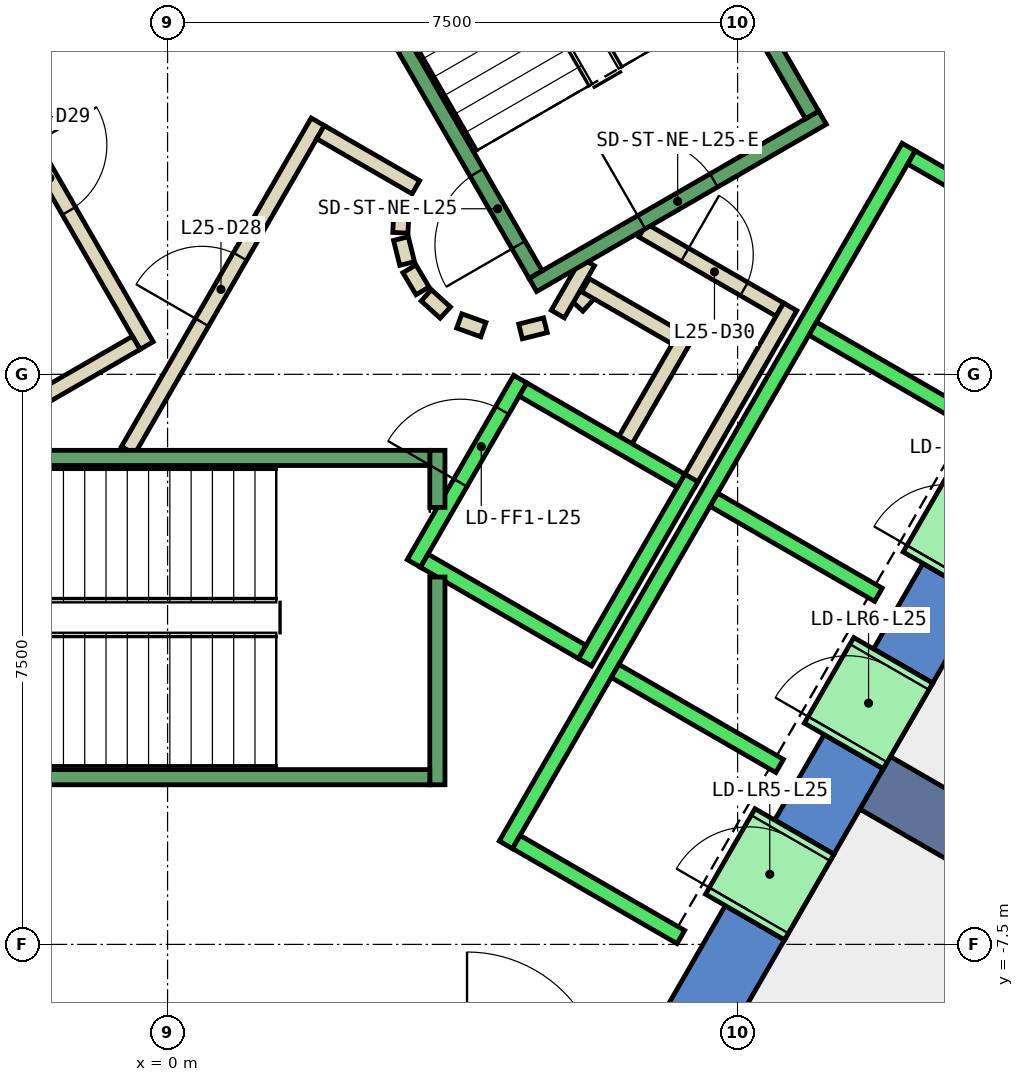
"""IFC4 building model, lengths in metres.
Left out: names, types, materials, properties, quantities, classifications, styles, units other than length and angle.
Written with IfcOpenShell. Run it as: python <this file> out.ifc"""

import sys

from ifc_helpers import new_model, si_unit, direction, frame, frame_2d, origin, place, context, subcontext, project, spatial, polyline, rectangle, outline, extrude, element, fill, save


model = new_model("IFC4")
c1 = context("Model", 3, precision=1e-05, world=origin(), true_north=direction((0.0, 1.0)))
c2 = subcontext(c1, "Body", "Model", "MODEL_VIEW")
j1 = project(units=[si_unit("LENGTHUNIT", "METRE"), si_unit("PLANEANGLEUNIT", "RADIAN")], contexts=[c1])
p1 = place(None, origin())
s1 = spatial("IfcSite", under=j1, at=p1, CompositionType="ELEMENT")
p2 = place(p1, origin())
s2 = spatial("IfcBuilding", under=s1, at=p2, CompositionType="ELEMENT")
p3 = place(p2, frame((0.0, 0.0, 116.0)))
s3 = spatial("IfcBuildingStorey", under=s2, at=p3, CompositionType="ELEMENT", Elevation=116.0)
p4 = place(p3, frame((0.0, 0.0, -0.4)))
e1 = element("IfcWall", 1, at=p4, inside=s3, PredefinedType="SHEAR", context=c2, shape_type="SweptSolid", body=[
    extrude(outline(polyline([(8.517, 11.748), (7.738, 11.298), (12.817, 2.5), (13.856, 2.5), (8.517, 11.748)])), origin(), (0.0, 0.0, 1.0), 4.2),
])
p5 = place(p3, frame((0.0, 0.0, -0.4)))
e2 = element("IfcWall", 2, at=p5, inside=s3, PredefinedType="SHEAR", context=c2, shape_type="SweptSolid", body=[
    extrude(outline(polyline([(8.117, -7.44), (7.338, -6.99), (6.409, -8.6), (6.928, -9.5), (8.117, -7.44)])), origin(), (0.0, 0.0, 1.0), 4.2),
])
p6 = place(p3, frame((0.0, 0.0, -0.4)))
e3 = element("IfcWall", 3, at=p6, inside=s3, PredefinedType="SHEAR", context=c2, shape_type="SweptSolid", body=[
    extrude(outline(polyline([(9.417, -5.189), (8.638, -4.739), (7.988, -5.864), (8.767, -6.314), (9.417, -5.189)])), origin(), (0.0, 0.0, 1.0), 4.2),
])
p7 = place(p3, frame((0.0, 0.0, -0.4)))
e4 = element("IfcWall", 4, at=p7, inside=s3, PredefinedType="SHEAR", context=c2, shape_type="SweptSolid", body=[
    extrude(outline(polyline([(10.717, -2.937), (9.938, -2.487), (9.288, -3.613), (10.067, -4.063), (10.717, -2.937)])), origin(), (0.0, 0.0, 1.0), 4.2),
])
p8 = place(p3, frame((0.0, 0.0, 3.6)))
e5 = element("IfcWall", 5, at=p8, inside=s3, PredefinedType="SHEAR", context=c2, shape_type="SweptSolid", body=[
    extrude(outline(polyline([(8.767, -6.314), (7.988, -5.864), (7.338, -6.99), (8.117, -7.44), (8.767, -6.314)])), origin(), (0.0, 0.0, 1.0), 0.2),
])
p9 = place(p3, frame((0.0, 0.0, 3.6)))
e6 = element("IfcWall", 6, at=p9, inside=s3, PredefinedType="SHEAR", context=c2, shape_type="SweptSolid", body=[
    extrude(outline(polyline([(10.067, -4.063), (9.288, -3.613), (8.638, -4.739), (9.417, -5.189), (10.067, -4.063)])), origin(), (0.0, 0.0, 1.0), 0.2),
])
p10 = place(p3, frame((0.0, 0.0, 3.6)))
e7 = element("IfcWall", 7, at=p10, inside=s3, PredefinedType="SHEAR", context=c2, shape_type="SweptSolid", body=[
    extrude(outline(polyline([(11.367, -1.811), (10.588, -1.361), (9.938, -2.487), (10.717, -2.937), (11.367, -1.811)])), origin(), (0.0, 0.0, 1.0), 0.2),
])
p11 = place(p3, frame((9.31, -5.375, -0.4), z_axis=(0.0, 0.0, 1.0), x_axis=(0.866017533419, -0.500013631625, 0.0)))
e8 = element("IfcWall", 8, at=p11, inside=s3, PredefinedType="SHEAR", context=c2, shape_type="SweptSolid", body=[
    extrude(rectangle(XDim=9.0, YDim=0.8, at=frame_2d((4.5, 0.0))), origin(), (0.0, 0.0, 1.0), 4.2),
])
p12 = place(p3, frame((5.39, 0.898, 0.0), z_axis=(0.0, 0.0, 1.0), x_axis=(0.673828488714, 0.738887791073, 0.0)))
e9 = element("IfcWall", 9, at=p12, inside=s3, PredefinedType="PARTITIONING", context=c2, shape_type="SweptSolid", body=[
    extrude(rectangle(XDim=0.263, YDim=0.2, at=frame_2d((0.131, 0.0))), origin(), (0.0, 0.0, 1.0), 3.8),
])
p13 = place(p3, frame((5.499, 1.172, 0.0), z_axis=(0.0, 0.0, 1.0), x_axis=(0.866333505267, -0.499465972466, 0.0)))
e10 = element("IfcWall", 10, at=p13, inside=s3, PredefinedType="PARTITIONING", context=c2, shape_type="SweptSolid", body=[
    extrude(rectangle(XDim=1.374, YDim=0.2, at=frame_2d((0.687, 0.0))), origin(), (0.0, 0.0, 1.0), 3.8),
])
p14 = place(p3, frame((6.826, 0.522, 0.0), z_axis=(0.0, 0.0, 1.0), x_axis=(-0.500016722714, -0.866015748706, 0.0)))
e11 = element("IfcWall", 11, at=p14, inside=s3, PredefinedType="PARTITIONING", context=c2, shape_type="SweptSolid", body=[
    extrude(rectangle(XDim=1.7, YDim=0.2, at=frame_2d((0.85, 0.0))), origin(), (0.0, 0.0, 1.0), 3.8),
])
p15 = place(p3, frame((6.25, 1.894, 0.0), z_axis=(0.0, 0.0, 1.0), x_axis=(0.866043184279, -0.499969202016, 0.0)))
e12 = element("IfcWall", 12, at=p15, inside=s3, PredefinedType="PARTITIONING", context=c2, shape_type="SweptSolid", body=[
    extrude(rectangle(XDim=2.084, YDim=0.2, at=frame_2d((1.042, 0.0))), origin(), (0.0, 0.0, 1.0), 3.8),
])
p16 = place(p15, frame((0.642, 0.0, 0.0)))
e13 = element("IfcOpeningElement", 13, at=p16, cuts=e12, PredefinedType="OPENING", context=c2, shape_type="SweptSolid", body=[
    extrude(rectangle(XDim=0.9, YDim=2.1, at=frame_2d((0.45, 1.05))), frame((0.0, 0.11, 0.0), z_axis=(0.0, -1.0, 0.0), x_axis=(1.0, 0.0, 0.0)), (0.0, 0.0, 1.0), 0.22),
])
p17 = place(p3, frame((8.192, 0.888, 0.0), z_axis=(0.0, 0.0, 1.0), x_axis=(-0.499940625693, -0.866059680843, 0.0)))
e14 = element("IfcWall", 14, at=p17, inside=s3, PredefinedType="PARTITIONING", context=c2, shape_type="SweptSolid", body=[
    extrude(rectangle(XDim=2.68, YDim=0.2, at=frame_2d((1.34, 0.0))), origin(), (0.0, 0.0, 1.0), 3.8),
])
p18 = place(p3, frame((5.135, 0.793, 0.0), z_axis=(0.0, 0.0, 1.0), x_axis=(0.499526442893, 0.866298639529, 0.0)))
e15 = element("IfcWall", 15, at=p18, inside=s3, PredefinedType="PARTITIONING", context=c2, shape_type="SweptSolid", body=[
    extrude(rectangle(XDim=0.791, YDim=0.2, at=frame_2d((0.396, 0.0))), origin(), (0.0, 0.0, 1.0), 3.8),
])
p19 = place(p3, frame((-0.52, -1.0, 0.0), z_axis=(0.0, 0.0, 1.0), x_axis=(0.50011622646, 0.865958290007, 0.0)))
e16 = element("IfcWall", 16, at=p19, inside=s3, PredefinedType="PARTITIONING", context=c2, shape_type="SweptSolid", body=[
    extrude(rectangle(XDim=4.991, YDim=0.2, at=frame_2d((2.496, 0.0))), origin(), (0.0, 0.0, 1.0), 3.8),
])
p20 = place(p19, frame((1.945, 0.0, 0.0)))
e17 = element("IfcOpeningElement", 17, at=p20, cuts=e16, PredefinedType="OPENING", context=c2, shape_type="SweptSolid", body=[
    extrude(rectangle(XDim=1.0, YDim=2.1, at=frame_2d((0.5, 1.05))), frame((0.0, 0.11, 0.0), z_axis=(0.0, -1.0, 0.0), x_axis=(1.0, 0.0, 0.0)), (0.0, 0.0, 1.0), 0.22),
])
p21 = place(p3, frame((2.012, 3.186, 0.0), z_axis=(0.0, 0.0, 1.0), x_axis=(0.865891012941, -0.500232699559, 0.0)))
e18 = element("IfcWall", 18, at=p21, inside=s3, PredefinedType="PARTITIONING", context=c2, shape_type="SweptSolid", body=[
    extrude(rectangle(XDim=1.449, YDim=0.2, at=frame_2d((0.725, 0.0))), origin(), (0.0, 0.0, 1.0), 3.8),
])
p22 = place(p3, frame((3.079, 2.199, 0.0), z_axis=(0.0, 0.0, 1.0), x_axis=(-0.047771483479, -0.998858290933, 0.0)))
e19 = element("IfcWall", 19, at=p22, inside=s3, PredefinedType="PARTITIONING", context=c2, shape_type="SweptSolid", body=[
    extrude(rectangle(XDim=0.337, YDim=0.2, at=frame_2d((0.169, 0.0))), origin(), (0.0, 0.0, 1.0), 3.8),
])
p23 = place(p3, frame((3.07, 1.786, 0.0), z_axis=(0.0, 0.0, 1.0), x_axis=(0.242705583207, -0.970099994784, 0.0)))
e20 = element("IfcWall", 20, at=p23, inside=s3, PredefinedType="PARTITIONING", context=c2, shape_type="SweptSolid", body=[
    extrude(rectangle(XDim=0.338, YDim=0.2, at=frame_2d((0.169, 0.0))), origin(), (0.0, 0.0, 1.0), 3.8),
])
for number, where, z_axis, x_axis in (
    (21, (3.182, 1.388, 0.0), (0.0, 0.0, 1.0), (0.512, -0.859, 0.0)),
    (22, (3.404, 1.039, 0.0), (0.0, 0.0, 1.0), (0.74, -0.672, 0.0)),
):
    element("IfcWall", number, at=place(p3, frame(where, z_axis=z_axis, x_axis=x_axis)), inside=s3, PredefinedType="PARTITIONING", context=c2, shape_type="SweptSolid", body=[
        extrude(rectangle(XDim=0.338, YDim=0.2, at=frame_2d((0.169, 0.0))), origin(), (0.0, 0.0, 1.0), 3.8),
    ])
p24 = place(p3, frame((3.838, 0.702, 0.0), z_axis=(0.0, 0.0, 1.0), x_axis=(0.941035081519, -0.338308993895, 0.0)))
e23 = element("IfcWall", 23, at=p24, inside=s3, PredefinedType="PARTITIONING", context=c2, shape_type="SweptSolid", body=[
    extrude(rectangle(XDim=0.337, YDim=0.2, at=frame_2d((0.168, 0.0))), origin(), (0.0, 0.0, 1.0), 3.8),
])
p25 = place(p3, frame((4.644, 0.564, 0.0), z_axis=(0.0, 0.0, 1.0), x_axis=(0.969929076366, 0.243387729394, 0.0)))
e24 = element("IfcWall", 24, at=p25, inside=s3, PredefinedType="PARTITIONING", context=c2, shape_type="SweptSolid", body=[
    extrude(rectangle(XDim=0.337, YDim=0.2, at=frame_2d((0.168, 0.0))), origin(), (0.0, 0.0, 1.0), 3.8),
])
p26 = place(p3, frame((-2.771, 4.7, 0.0), z_axis=(0.0, 0.0, 1.0), x_axis=(0.499969479948, -0.866043023828, 0.0)))
e25 = element("IfcWall", 25, at=p26, inside=s3, PredefinedType="PARTITIONING", context=c2, shape_type="SweptSolid", body=[
    extrude(rectangle(XDim=4.99, YDim=0.2, at=frame_2d((2.495, 0.0))), origin(), (0.0, 0.0, 1.0), 3.8),
])
p27 = place(p26, frame((1.945, 0.0, 0.0)))
e26 = element("IfcOpeningElement", 26, at=p27, cuts=e25, PredefinedType="OPENING", context=c2, shape_type="SweptSolid", body=[
    extrude(rectangle(XDim=1.0, YDim=2.1, at=frame_2d((0.5, 1.05))), frame((0.0, 0.11, 0.0), z_axis=(0.0, -1.0, 0.0), x_axis=(1.0, 0.0, 0.0)), (0.0, 0.0, 1.0), 0.22),
])
p28 = place(p3, frame((-0.412, 0.414, 0.0), z_axis=(0.0, 0.0, 1.0), x_axis=(-0.866017369001, -0.500013916395, 0.0)))
e27 = element("IfcWall", 27, at=p28, inside=s3, PredefinedType="PARTITIONING", context=c2, shape_type="SweptSolid", body=[
    extrude(rectangle(XDim=1.45, YDim=0.2, at=frame_2d((0.725, 0.0))), origin(), (0.0, 0.0, 1.0), 3.8),
])
p29 = place(p3, frame((12.401, -7.621, 0.0), z_axis=(0.0, 0.0, 1.0), x_axis=(-0.499983724212, -0.866034800411, 0.0)))
e28 = element("IfcWall", 28, at=p29, inside=s3, PredefinedType="PARTITIONING", context=c2, shape_type="SweptSolid", body=[
    extrude(rectangle(XDim=9.302, YDim=0.2, at=frame_2d((4.651, 0.0))), origin(), (0.0, 0.0, 1.0), 3.8),
])
p30 = place(p3, frame((3.24, -2.488, 0.0), z_axis=(0.0, 0.0, 1.0), x_axis=(0.49994636267, 0.866056369097, 0.0)))
e29 = element("IfcWall", 29, at=p30, inside=s3, PredefinedType="STANDARD", context=c2, shape_type="SweptSolid", body=[
    extrude(rectangle(XDim=2.8, YDim=0.2, at=frame_2d((1.4, 0.0))), origin(), (0.0, 0.0, 1.0), 3.8),
])
p31 = place(p30, frame((1.225, 0.0, 0.0)))
e30 = element("IfcOpeningElement", 30, at=p31, cuts=e29, PredefinedType="OPENING", context=c2, shape_type="SweptSolid", body=[
    extrude(rectangle(XDim=1.1, YDim=2.1, at=frame_2d((0.55, 1.05))), frame((0.0, 0.11, 0.0), z_axis=(0.0, -1.0, 0.0), x_axis=(1.0, 0.0, 0.0)), (0.0, 0.0, 1.0), 0.22),
])
p32 = place(p3, frame((5.492, -3.788, 0.0), z_axis=(0.0, 0.0, 1.0), x_axis=(0.500011755427, 0.866018616679, 0.0)))
e31 = element("IfcWall", 31, at=p32, inside=s3, PredefinedType="STANDARD", context=c2, shape_type="SweptSolid", body=[
    extrude(rectangle(XDim=2.8, YDim=0.2, at=frame_2d((1.4, 0.0))), origin(), (0.0, 0.0, 1.0), 3.8),
])
p33 = place(p3, frame((3.377, -2.452, 0.0), z_axis=(0.0, 0.0, 1.0), x_axis=(0.865955154139, -0.50012165622, 0.0)))
e32 = element("IfcWall", 32, at=p33, inside=s3, PredefinedType="STANDARD", context=c2, shape_type="SweptSolid", body=[
    extrude(rectangle(XDim=2.4, YDim=0.2, at=frame_2d((1.2, 0.0))), origin(), (0.0, 0.0, 1.0), 3.8),
])
p34 = place(p3, frame((4.677, -0.2, 0.0), z_axis=(0.0, 0.0, 1.0), x_axis=(0.865973769406, -0.500089422704, 0.0)))
e33 = element("IfcWall", 33, at=p34, inside=s3, PredefinedType="STANDARD", context=c2, shape_type="SweptSolid", body=[
    extrude(rectangle(XDim=2.399, YDim=0.2, at=frame_2d((1.2, 0.0))), origin(), (0.0, 0.0, 1.0), 3.8),
])
p35 = place(p3, frame((4.451, -6.19, 0.0), z_axis=(0.0, 0.0, 1.0), x_axis=(0.50000090737, 0.866024879913, 0.0)))
e34 = element("IfcWall", 34, at=p35, inside=s3, PredefinedType="STANDARD", context=c2, shape_type="SweptSolid", body=[
    extrude(rectangle(XDim=10.6, YDim=0.2, at=frame_2d((5.3, 0.0))), origin(), (0.0, 0.0, 1.0), 3.8),
])
for number, where, z_axis, x_axis in (
    (35, (4.588, -6.153, 0.0), (0.0, 0.0, 1.0), (0.866, -0.5, 0.0)),
    (36, (5.888, -3.902, 0.0), (0.0, 0.0, 1.0), (0.866, -0.5, 0.0)),
    (37, (7.188, -1.65, 0.0), (0.0, 0.0, 1.0), (0.866, -0.5, 0.0)),
    (38, (8.488, 0.602, 0.0), (0.0, 0.0, 1.0), (0.866, -0.5, 0.0)),
):
    element("IfcWall", number, at=place(p3, frame(where, z_axis=z_axis, x_axis=x_axis)), inside=s3, PredefinedType="STANDARD", context=c2, shape_type="SweptSolid", body=[
        extrude(rectangle(XDim=2.5, YDim=0.2, at=frame_2d((1.25, 0.0))), origin(), (0.0, 0.0, 1.0), 3.8),
    ])
p36 = place(p3, frame((9.788, 2.853, 0.0), z_axis=(0.0, 0.0, 1.0), x_axis=(0.865998541277, -0.500046524342, 0.0)))
e39 = element("IfcWall", 39, at=p36, inside=s3, PredefinedType="STANDARD", context=c2, shape_type="SweptSolid", body=[
    extrude(rectangle(XDim=2.5, YDim=0.2, at=frame_2d((1.25, 0.0))), origin(), (0.0, 0.0, 1.0), 3.8),
])
p37 = place(p3, frame((7.598, -7.14, 0.0), z_axis=(0.0, 0.0, 1.0), x_axis=(0.500362116554, 0.865816234728, 0.0)))
e40 = element("IfcWall", 40, at=p37, inside=s3, PredefinedType="STANDARD", context=c2, shape_type="SweptSolid", body=[
    extrude(rectangle(XDim=1.299, YDim=1.2, at=frame_2d((0.65, 0.0))), origin(), (0.0, 0.0, 1.0), 2.4),
])
p38 = place(p37, frame((0.1, 0.0, 0.0)))
e41 = element("IfcOpeningElement", 41, at=p38, cuts=e40, PredefinedType="OPENING", context=c2, shape_type="SweptSolid", body=[
    extrude(rectangle(XDim=1.1, YDim=2.3, at=frame_2d((0.55, 1.15))), frame((0.0, 0.61, 0.0), z_axis=(0.0, -1.0, 0.0), x_axis=(1.0, 0.0, 0.0)), (0.0, 0.0, 1.0), 1.22),
])
p39 = place(p3, frame((8.898, -4.889, 0.0), z_axis=(0.0, 0.0, 1.0), x_axis=(0.500036693733, 0.866004217611, 0.0)))
e42 = element("IfcWall", 42, at=p39, inside=s3, PredefinedType="STANDARD", context=c2, shape_type="SweptSolid", body=[
    extrude(rectangle(XDim=1.3, YDim=1.2, at=frame_2d((0.65, 0.0))), origin(), (0.0, 0.0, 1.0), 2.4),
])
p40 = place(p39, frame((0.1, 0.0, 0.0)))
e43 = element("IfcOpeningElement", 43, at=p40, cuts=e42, PredefinedType="OPENING", context=c2, shape_type="SweptSolid", body=[
    extrude(rectangle(XDim=1.1, YDim=2.3, at=frame_2d((0.55, 1.15))), frame((0.0, 0.61, 0.0), z_axis=(0.0, -1.0, 0.0), x_axis=(1.0, 0.0, 0.0)), (0.0, 0.0, 1.0), 1.22),
])
p41 = place(p3, frame((10.198, -2.637, 0.0), z_axis=(0.0, 0.0, 1.0), x_axis=(0.49989585183, 0.866085525409, 0.0)))
e44 = element("IfcWall", 44, at=p41, inside=s3, PredefinedType="STANDARD", context=c2, shape_type="SweptSolid", body=[
    extrude(rectangle(XDim=1.3, YDim=1.2, at=frame_2d((0.65, 0.0))), origin(), (0.0, 0.0, 1.0), 2.4),
])
p42 = place(p41, frame((0.1, 0.0, 0.0)))
e45 = element("IfcOpeningElement", 45, at=p42, cuts=e44, PredefinedType="OPENING", context=c2, shape_type="SweptSolid", body=[
    extrude(rectangle(XDim=1.1, YDim=2.3, at=frame_2d((0.55, 1.15))), frame((0.0, 0.61, 0.0), z_axis=(0.0, -1.0, 0.0), x_axis=(1.0, 0.0, 0.0)), (0.0, 0.0, 1.0), 1.22),
])
p43 = place(p3, frame((3.55, -2.667, 0.0), z_axis=(0.0, 0.0, 1.0), x_axis=(0.0, -1.0, 0.0)))
e46 = element("IfcWall", 46, at=p43, inside=s3, PredefinedType="STANDARD", context=c2, shape_type="SweptSolid", body=[
    extrude(rectangle(XDim=2.733, YDim=0.2, at=frame_2d((1.366, 0.0))), origin(), (0.0, 0.0, 1.0), 3.8),
])
p44 = place(p3, frame((3.55, -1.0, 0.0), z_axis=(0.0, 0.0, 1.0), x_axis=(0.0, -1.0, 0.0)))
e47 = element("IfcWall", 47, at=p44, inside=s3, PredefinedType="STANDARD", context=c2, shape_type="SweptSolid", body=[
    extrude(rectangle(XDim=0.751, YDim=0.2, at=frame_2d((0.375, 0.0))), origin(), (0.0, 0.0, 1.0), 3.8),
])
p45 = place(p3, frame((-3.45, -1.1, 0.0), z_axis=(0.0, 0.0, 1.0), x_axis=(1.0, 0.0, 0.0)))
e48 = element("IfcWall", 48, at=p45, inside=s3, PredefinedType="STANDARD", context=c2, shape_type="SweptSolid", body=[
    extrude(rectangle(XDim=6.9, YDim=0.2, at=frame_2d((3.45, 0.0))), origin(), (0.0, 0.0, 1.0), 3.8),
])
p46 = place(p45, frame((0.45, 0.0, 0.0)))
e49 = element("IfcOpeningElement", 49, at=p46, cuts=e48, PredefinedType="OPENING", context=c2, shape_type="SweptSolid", body=[
    extrude(rectangle(XDim=1.1, YDim=2.2, at=frame_2d((0.55, 1.1))), frame((0.0, 0.11, 0.0), z_axis=(0.0, -1.0, 0.0), x_axis=(1.0, 0.0, 0.0)), (0.0, 0.0, 1.0), 0.22),
])
p47 = place(p3, frame((-3.45, -5.3, 0.0), z_axis=(0.0, 0.0, 1.0), x_axis=(1.0, 0.0, 0.0)))
e50 = element("IfcWall", 50, at=p47, inside=s3, PredefinedType="STANDARD", context=c2, shape_type="SweptSolid", body=[
    extrude(rectangle(XDim=6.9, YDim=0.2, at=frame_2d((3.45, 0.0))), origin(), (0.0, 0.0, 1.0), 3.8),
])
p48 = place(p3, frame((4.806, 1.176, 0.0), z_axis=(0.0, 0.0, 1.0), x_axis=(0.866059941101, 0.499940174841, 0.0)))
e51 = element("IfcWall", 51, at=p48, inside=s3, PredefinedType="STANDARD", context=c2, shape_type="SweptSolid", body=[
    extrude(rectangle(XDim=4.4, YDim=0.2, at=frame_2d((2.2, 0.0))), origin(), (0.0, 0.0, 1.0), 3.8),
])
p49 = place(p48, frame((1.65, 0.0, 0.0)))
e52 = element("IfcOpeningElement", 52, at=p49, cuts=e51, PredefinedType="OPENING", context=c2, shape_type="SweptSolid", body=[
    extrude(rectangle(XDim=1.1, YDim=2.2, at=frame_2d((0.55, 1.1))), frame((0.0, 0.11, 0.0), z_axis=(0.0, -1.0, 0.0), x_axis=(1.0, 0.0, 0.0)), (0.0, 0.0, 1.0), 0.22),
])
p50 = place(p3, frame((4.843, 1.312, 0.0), z_axis=(0.0, 0.0, 1.0), x_axis=(-0.499963383562, 0.866046543262, 0.0)))
e53 = element("IfcWall", 53, at=p50, inside=s3, PredefinedType="STANDARD", context=c2, shape_type="SweptSolid", body=[
    extrude(rectangle(XDim=6.9, YDim=0.2, at=frame_2d((3.45, 0.0))), origin(), (0.0, 0.0, 1.0), 3.8),
])
p51 = place(p50, frame((0.45, 0.0, 0.0)))
e54 = element("IfcOpeningElement", 54, at=p51, cuts=e53, PredefinedType="OPENING", context=c2, shape_type="SweptSolid", body=[
    extrude(rectangle(XDim=1.1, YDim=2.2, at=frame_2d((0.55, 1.1))), frame((0.0, 0.11, 0.0), z_axis=(0.0, -1.0, 0.0), x_axis=(1.0, 0.0, 0.0)), (0.0, 0.0, 1.0), 0.22),
])
p52 = place(p3, frame((8.48, 3.412, 0.0), z_axis=(0.0, 0.0, 1.0), x_axis=(-0.499978703459, 0.866037698999, 0.0)))
e55 = element("IfcWall", 55, at=p52, inside=s3, PredefinedType="STANDARD", context=c2, shape_type="SweptSolid", body=[
    extrude(rectangle(XDim=6.9, YDim=0.2, at=frame_2d((3.45, 0.0))), origin(), (0.0, 0.0, 1.0), 3.8),
])
p53 = place(p3, frame((-1.393, 7.288, 0.0), z_axis=(0.0, 0.0, 1.0), x_axis=(-0.499963383562, -0.866046543262, 0.0)))
e56 = element("IfcWall", 56, at=p53, inside=s3, PredefinedType="STANDARD", context=c2, shape_type="SweptSolid", body=[
    extrude(rectangle(XDim=6.9, YDim=0.2, at=frame_2d((3.45, 0.0))), origin(), (0.0, 0.0, 1.0), 3.8),
])
p54 = place(p53, frame((0.45, 0.0, 0.0)))
e57 = element("IfcOpeningElement", 57, at=p54, cuts=e56, PredefinedType="OPENING", context=c2, shape_type="SweptSolid", body=[
    extrude(rectangle(XDim=1.1, YDim=2.2, at=frame_2d((0.55, 1.1))), frame((0.0, 0.11, 0.0), z_axis=(0.0, -1.0, 0.0), x_axis=(1.0, 0.0, 0.0)), (0.0, 0.0, 1.0), 0.22),
])
p55 = place(p20, origin())
e58 = element("IfcDoor", 58, at=p55, inside=s3, OperationType="SINGLE_SWING_LEFT", PredefinedType="DOOR", context=c2, shape_type="SweptSolid", body=[
    extrude(rectangle(XDim=1.0, YDim=2.1, at=frame_2d((0.5, 1.05))), frame((0.0, 0.025, 0.0), z_axis=(0.0, -1.0, 0.0), x_axis=(1.0, 0.0, 0.0)), (0.0, 0.0, 1.0), 0.05),
])
fill(e17, e58)
p56 = place(p27, origin())
e59 = element("IfcDoor", 59, at=p56, inside=s3, OperationType="SINGLE_SWING_RIGHT", PredefinedType="DOOR", context=c2, shape_type="SweptSolid", body=[
    extrude(rectangle(XDim=1.0, YDim=2.1, at=frame_2d((0.5, 1.05))), frame((0.0, 0.025, 0.0), z_axis=(0.0, -1.0, 0.0), x_axis=(1.0, 0.0, 0.0)), (0.0, 0.0, 1.0), 0.05),
])
fill(e26, e59)
p57 = place(p16, origin())
e60 = element("IfcDoor", 60, at=p57, inside=s3, OperationType="SINGLE_SWING_LEFT", PredefinedType="DOOR", context=c2, shape_type="SweptSolid", body=[
    extrude(rectangle(XDim=0.9, YDim=2.1, at=frame_2d((0.45, 1.05))), frame((0.0, 0.025, 0.0), z_axis=(0.0, -1.0, 0.0), x_axis=(1.0, 0.0, 0.0)), (0.0, 0.0, 1.0), 0.05),
])
fill(e13, e60)
p58 = place(p38, origin())
e61 = element("IfcDoor", 61, at=p58, inside=s3, OperationType="SLIDING_TO_LEFT", PredefinedType="DOOR", context=c2, shape_type="SweptSolid", body=[
    extrude(rectangle(XDim=1.1, YDim=2.3, at=frame_2d((0.55, 1.15))), frame((0.0, 0.025, 0.0), z_axis=(0.0, -1.0, 0.0), x_axis=(1.0, 0.0, 0.0)), (0.0, 0.0, 1.0), 0.05),
])
fill(e41, e61)
p59 = place(p40, origin())
e62 = element("IfcDoor", 62, at=p59, inside=s3, OperationType="SLIDING_TO_LEFT", PredefinedType="DOOR", context=c2, shape_type="SweptSolid", body=[
    extrude(rectangle(XDim=1.1, YDim=2.3, at=frame_2d((0.55, 1.15))), frame((0.0, 0.025, 0.0), z_axis=(0.0, -1.0, 0.0), x_axis=(1.0, 0.0, 0.0)), (0.0, 0.0, 1.0), 0.05),
])
fill(e43, e62)
p60 = place(p31, origin())
e63 = element("IfcDoor", 63, at=p60, inside=s3, OperationType="SLIDING_TO_LEFT", PredefinedType="DOOR", context=c2, shape_type="SweptSolid", body=[
    extrude(rectangle(XDim=1.1, YDim=2.1, at=frame_2d((0.55, 1.05))), frame((0.0, 0.025, 0.0), z_axis=(0.0, -1.0, 0.0), x_axis=(1.0, 0.0, 0.0)), (0.0, 0.0, 1.0), 0.05),
])
fill(e30, e63)
p61 = place(p51, origin())
e64 = element("IfcDoor", 64, at=p61, inside=s3, OperationType="SINGLE_SWING_LEFT", PredefinedType="DOOR", context=c2, shape_type="SweptSolid", body=[
    extrude(rectangle(XDim=1.1, YDim=2.2, at=frame_2d((0.55, 1.1))), frame((0.0, 0.025, 0.0), z_axis=(0.0, -1.0, 0.0), x_axis=(1.0, 0.0, 0.0)), (0.0, 0.0, 1.0), 0.05),
])
fill(e54, e64)
p62 = place(p49, origin())
e65 = element("IfcDoor", 65, at=p62, inside=s3, OperationType="SINGLE_SWING_LEFT", PredefinedType="DOOR", context=c2, shape_type="SweptSolid", body=[
    extrude(rectangle(XDim=1.1, YDim=2.2, at=frame_2d((0.55, 1.1))), frame((0.0, 0.025, 0.0), z_axis=(0.0, -1.0, 0.0), x_axis=(1.0, 0.0, 0.0)), (0.0, 0.0, 1.0), 0.05),
])
fill(e52, e65)
save(model, sys.argv[1])
